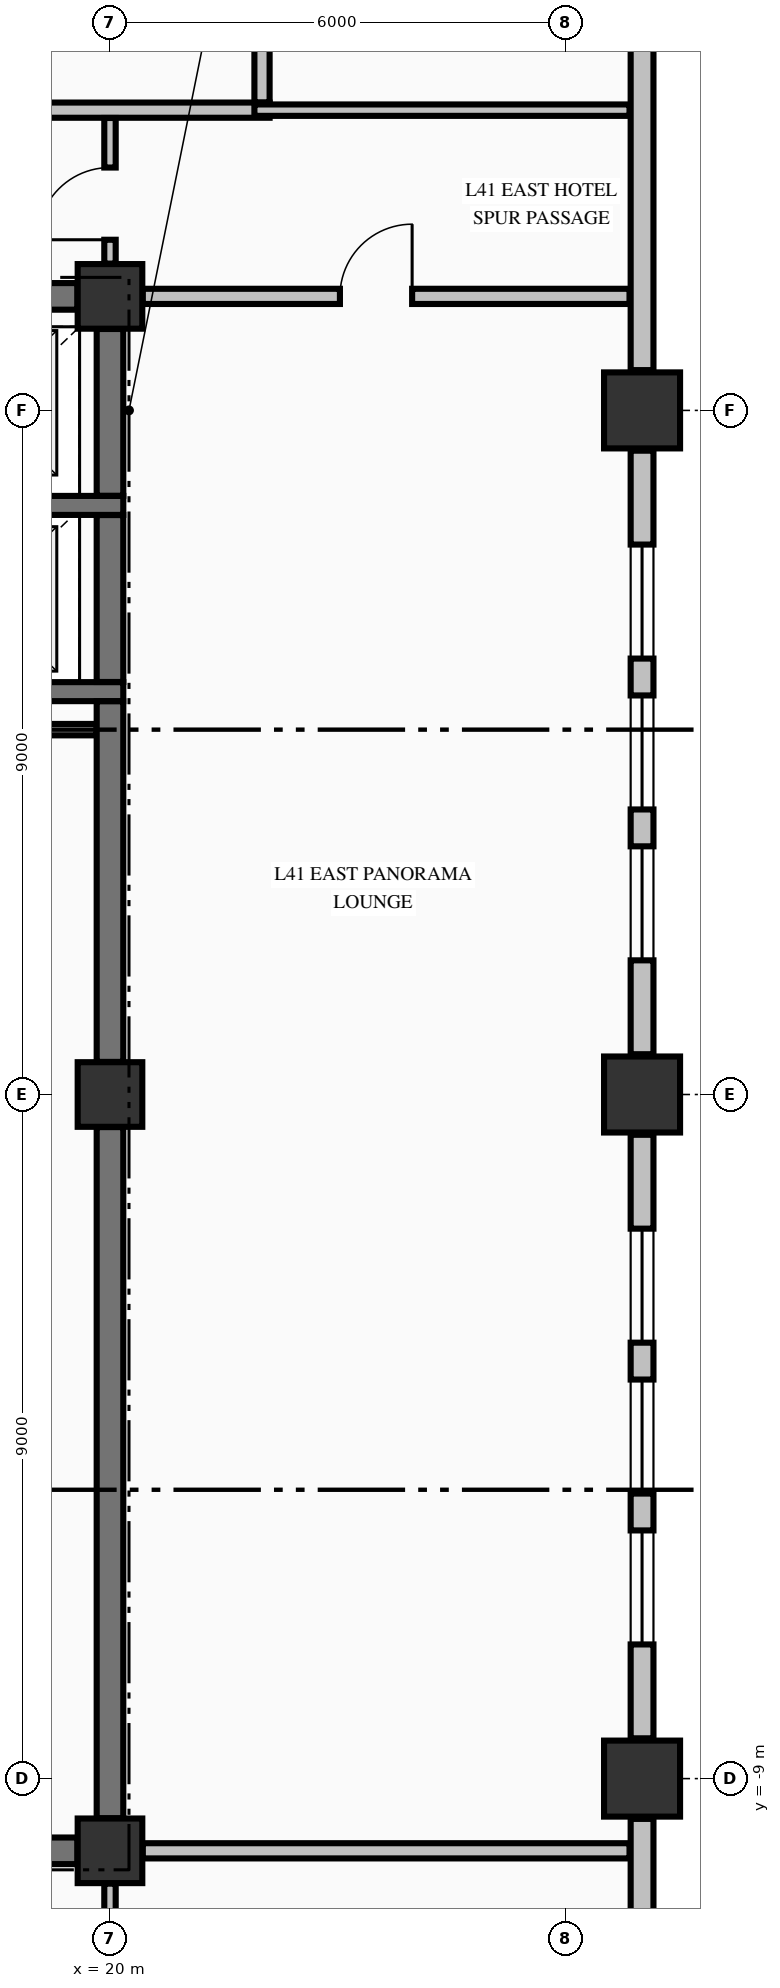
"""IFC4 building model, lengths in metres.
Left out: names, types, materials, properties, quantities, classifications, styles, units other than length and angle.
Written with IfcOpenShell. Run it as: python <this file> out.ifc"""

import sys

from ifc_helpers import new_model, si_unit, direction, frame, frame_2d, origin, origin_2d, place, context, subcontext, project, spatial, rectangle, extrude, element, fill, save


model = new_model("IFC4")
c1 = context("Model", 3, precision=1e-05, world=origin(), true_north=direction((0.0, 1.0)))
c2 = subcontext(c1, "Body", "Model", "MODEL_VIEW")
j1 = project(units=[si_unit("LENGTHUNIT", "METRE"), si_unit("PLANEANGLEUNIT", "RADIAN")], contexts=[c1])
p1 = place(None, origin())
s1 = spatial("IfcSite", under=j1, at=p1, CompositionType="ELEMENT")
p2 = place(p1, origin())
s2 = spatial("IfcBuilding", under=s1, at=p2, CompositionType="ELEMENT")
p3 = place(p2, frame((0.0, 0.0, 162.66)))
s3 = spatial("IfcBuildingStorey", under=s2, at=p3, CompositionType="ELEMENT", Elevation=162.66)
for number, where, z_axis, x_axis in (
    (1, (27.0, -9.0, -0.25), (0.0, 0.0, 1.0), (1.0, 0.0, 0.0)),
    (2, (27.0, 0.0, -0.25), (0.0, 0.0, 1.0), (1.0, 0.0, 0.0)),
    (3, (27.0, 9.0, -0.25), (0.0, 0.0, 1.0), (1.0, 0.0, 0.0)),
):
    element("IfcColumn", number, at=place(p3, frame(where, z_axis=z_axis, x_axis=x_axis)), inside=s3, PredefinedType="COLUMN", context=c2, shape_type="SweptSolid", body=[
        extrude(rectangle(XDim=1.0, YDim=1.0, at=origin_2d()), origin(), (0.0, 0.0, 1.0), 3.4),
    ])
for number, where, z_axis, x_axis in (
    (4, (20.0, -9.95, -0.25), (0.0, 0.0, 1.0), (1.0, 0.0, 0.0)),
    (5, (20.0, 10.5, -0.25), (0.0, 0.0, 1.0), (1.0, 0.0, 0.0)),
    (6, (20.0, 0.0, -0.25), (0.0, 0.0, 1.0), (1.0, 0.0, 0.0)),
):
    element("IfcColumn", number, at=place(p3, frame(where, z_axis=z_axis, x_axis=x_axis)), inside=s3, PredefinedType="COLUMN", context=c2, shape_type="SweptSolid", body=[
        extrude(rectangle(XDim=0.85, YDim=0.85, at=origin_2d()), origin(), (0.0, 0.0, 1.0), 3.4),
    ])
p4 = place(p3, frame((27.0, -18.97, 0.0), z_axis=(0.0, 0.0, 1.0), x_axis=(0.0, 1.0, 0.0)))
e7 = element("IfcWall", 7, at=p4, inside=s3, PredefinedType="STANDARD", context=c2, shape_type="SweptSolid", body=[
    extrude(rectangle(XDim=9.44, YDim=0.3, at=frame_2d((4.72, 0.0))), origin(), (0.0, 0.0, 1.0), 2.542),
])
p5 = place(p3, frame((27.0, -8.47, 0.0), z_axis=(0.0, 0.0, 1.0), x_axis=(0.0, 1.0, 0.0)))
e8 = element("IfcWall", 8, at=p5, inside=s3, PredefinedType="STANDARD", context=c2, shape_type="SweptSolid", body=[
    extrude(rectangle(XDim=7.94, YDim=0.3, at=frame_2d((3.97, 0.0))), origin(), (0.0, 0.0, 1.0), 2.542),
])
p6 = place(p5, frame((1.235, 0.0, 0.72)))
e9 = element("IfcOpeningElement", 9, at=p6, cuts=e8, PredefinedType="OPENING", context=c2, shape_type="SweptSolid", body=[
    extrude(rectangle(XDim=1.5, YDim=1.6, at=frame_2d((0.75, 0.8))), frame((0.0, 0.16, 0.0), z_axis=(0.0, -1.0, 0.0), x_axis=(1.0, 0.0, 0.0)), (0.0, 0.0, 1.0), 0.32),
])
p7 = place(p5, frame((3.22, 0.0, 0.72)))
e10 = element("IfcOpeningElement", 10, at=p7, cuts=e8, PredefinedType="OPENING", context=c2, shape_type="SweptSolid", body=[
    extrude(rectangle(XDim=1.5, YDim=1.6, at=frame_2d((0.75, 0.8))), frame((0.0, 0.16, 0.0), z_axis=(0.0, -1.0, 0.0), x_axis=(1.0, 0.0, 0.0)), (0.0, 0.0, 1.0), 0.32),
])
p8 = place(p5, frame((5.205, 0.0, 0.72)))
e11 = element("IfcOpeningElement", 11, at=p8, cuts=e8, PredefinedType="OPENING", context=c2, shape_type="SweptSolid", body=[
    extrude(rectangle(XDim=1.5, YDim=1.6, at=frame_2d((0.75, 0.8))), frame((0.0, 0.16, 0.0), z_axis=(0.0, -1.0, 0.0), x_axis=(1.0, 0.0, 0.0)), (0.0, 0.0, 1.0), 0.32),
])
p9 = place(p3, frame((27.0, 0.53, 0.0), z_axis=(0.0, 0.0, 1.0), x_axis=(0.0, 1.0, 0.0)))
e12 = element("IfcWall", 12, at=p9, inside=s3, PredefinedType="STANDARD", context=c2, shape_type="SweptSolid", body=[
    extrude(rectangle(XDim=7.94, YDim=0.3, at=frame_2d((3.97, 0.0))), origin(), (0.0, 0.0, 1.0), 2.542),
])
p10 = place(p9, frame((1.235, 0.0, 0.72)))
e13 = element("IfcOpeningElement", 13, at=p10, cuts=e12, PredefinedType="OPENING", context=c2, shape_type="SweptSolid", body=[
    extrude(rectangle(XDim=1.5, YDim=1.6, at=frame_2d((0.75, 0.8))), frame((0.0, 0.16, 0.0), z_axis=(0.0, -1.0, 0.0), x_axis=(1.0, 0.0, 0.0)), (0.0, 0.0, 1.0), 0.32),
])
p11 = place(p9, frame((3.22, 0.0, 0.72)))
e14 = element("IfcOpeningElement", 14, at=p11, cuts=e12, PredefinedType="OPENING", context=c2, shape_type="SweptSolid", body=[
    extrude(rectangle(XDim=1.5, YDim=1.6, at=frame_2d((0.75, 0.8))), frame((0.0, 0.16, 0.0), z_axis=(0.0, -1.0, 0.0), x_axis=(1.0, 0.0, 0.0)), (0.0, 0.0, 1.0), 0.32),
])
p12 = place(p9, frame((5.205, 0.0, 0.72)))
e15 = element("IfcOpeningElement", 15, at=p12, cuts=e12, PredefinedType="OPENING", context=c2, shape_type="SweptSolid", body=[
    extrude(rectangle(XDim=1.5, YDim=1.6, at=frame_2d((0.75, 0.8))), frame((0.0, 0.16, 0.0), z_axis=(0.0, -1.0, 0.0), x_axis=(1.0, 0.0, 0.0)), (0.0, 0.0, 1.0), 0.32),
])
p13 = place(p3, frame((27.0, 9.53, 0.0), z_axis=(0.0, 0.0, 1.0), x_axis=(0.0, 1.0, 0.0)))
e16 = element("IfcWall", 16, at=p13, inside=s3, PredefinedType="STANDARD", context=c2, shape_type="SweptSolid", body=[
    extrude(rectangle(XDim=9.44, YDim=0.3, at=frame_2d((4.72, 0.0))), origin(), (0.0, 0.0, 1.0), 2.542),
])
p14 = place(p3, frame((14.7, -9.95, 0.0), z_axis=(0.0, 0.0, 1.0), x_axis=(1.0, 0.0, 0.0)))
e17 = element("IfcWall", 17, at=p14, inside=s3, PredefinedType="SHEAR", context=c2, shape_type="SweptSolid", body=[
    extrude(rectangle(XDim=4.871, YDim=0.35, at=frame_2d((2.436, 0.0))), origin(), (0.0, 0.0, 1.0), 3.15),
])
p15 = place(p14, frame((3.25, 0.0, 0.0)))
e18 = element("IfcOpeningElement", 18, at=p15, cuts=e17, PredefinedType="OPENING", context=c2, shape_type="SweptSolid", body=[
    extrude(rectangle(XDim=0.9, YDim=2.15, at=frame_2d((0.45, 1.075))), frame((0.0, 0.185, 0.0), z_axis=(0.0, -1.0, 0.0), x_axis=(1.0, 0.0, 0.0)), (0.0, 0.0, 1.0), 0.37),
])
p16 = place(p14, frame((0.575, 0.0, 0.0)))
e19 = element("IfcOpeningElement", 19, at=p16, cuts=e17, PredefinedType="OPENING", context=c2, shape_type="SweptSolid", body=[
    extrude(rectangle(XDim=0.95, YDim=2.15, at=frame_2d((0.475, 1.075))), frame((0.0, 0.185, 0.0), z_axis=(0.0, -1.0, 0.0), x_axis=(1.0, 0.0, 0.0)), (0.0, 0.0, 1.0), 0.37),
])
for number, where, z_axis, x_axis in (
    (20, (17.025, 5.3, 0.0), (0.0, 0.0, 1.0), (1.0, 0.0, 0.0)),
    (21, (17.025, 7.75, 0.0), (0.0, 0.0, 1.0), (1.0, 0.0, 0.0)),
):
    element("IfcWall", number, at=place(p3, frame(where, z_axis=z_axis, x_axis=x_axis)), inside=s3, PredefinedType="SOLIDWALL", context=c2, shape_type="SweptSolid", body=[
        extrude(rectangle(XDim=3.15, YDim=0.25, at=frame_2d((1.575, 0.0))), origin(), (0.0, 0.0, 1.0), 3.15),
    ])
p17 = place(p3, frame((14.7, 10.5, 0.0), z_axis=(0.0, 0.0, 1.0), x_axis=(1.0, 0.0, 0.0)))
e22 = element("IfcWall", 22, at=p17, inside=s3, PredefinedType="SHEAR", context=c2, shape_type="SweptSolid", body=[
    extrude(rectangle(XDim=4.871, YDim=0.35, at=frame_2d((2.436, 0.0))), origin(), (0.0, 0.0, 1.0), 3.15),
])
p18 = place(p17, frame((0.7, 0.0, 0.0)))
e23 = element("IfcOpeningElement", 23, at=p18, cuts=e22, PredefinedType="OPENING", context=c2, shape_type="SweptSolid", body=[
    extrude(rectangle(XDim=1.1, YDim=2.15, at=frame_2d((0.55, 1.075))), frame((0.0, 0.185, 0.0), z_axis=(0.0, -1.0, 0.0), x_axis=(1.0, 0.0, 0.0)), (0.0, 0.0, 1.0), 0.37),
])
p19 = place(p3, frame((20.431, -9.95, 0.0), z_axis=(0.0, 0.0, 1.0), x_axis=(1.0, 0.0, 0.0)))
e24 = element("IfcWall", 24, at=p19, inside=s3, PredefinedType="PARTITIONING", context=c2, shape_type="SweptSolid", body=[
    extrude(rectangle(XDim=6.404, YDim=0.2, at=frame_2d((3.202, 0.0))), origin(), (0.0, 0.0, 1.0), 3.15),
])
p20 = place(p3, frame((14.878, 4.8, 0.0), z_axis=(0.0, 0.0, 1.0), x_axis=(1.0, 0.0, 0.0)))
e25 = element("IfcWall", 25, at=p20, inside=s3, PredefinedType="PARTITIONING", context=c2, shape_type="SweptSolid", body=[
    extrude(rectangle(XDim=4.944, YDim=0.15, at=frame_2d((2.472, 0.0))), origin(), (0.0, 0.0, 1.0), 3.15),
])
p21 = place(p3, frame((20.431, 10.5, 0.0), z_axis=(0.0, 0.0, 1.0), x_axis=(1.0, 0.0, 0.0)))
e26 = element("IfcWall", 26, at=p21, inside=s3, PredefinedType="PARTITIONING", context=c2, shape_type="SweptSolid", body=[
    extrude(rectangle(XDim=6.404, YDim=0.2, at=frame_2d((3.202, 0.0))), origin(), (0.0, 0.0, 1.0), 3.15),
])
p22 = place(p21, frame((2.594, 0.0, 0.0)))
e27 = element("IfcOpeningElement", 27, at=p22, cuts=e26, PredefinedType="OPENING", context=c2, shape_type="SweptSolid", body=[
    extrude(rectangle(XDim=0.95, YDim=2.15, at=frame_2d((0.475, 1.075))), frame((0.0, 0.11, 0.0), z_axis=(0.0, -1.0, 0.0), x_axis=(1.0, 0.0, 0.0)), (0.0, 0.0, 1.0), 0.22),
])
p23 = place(p3, frame((-17.1, 12.95, 0.0), z_axis=(0.0, 0.0, 1.0), x_axis=(1.0, 0.0, 0.0)))
e28 = element("IfcWall", 28, at=p23, inside=s3, PredefinedType="PARTITIONING", context=c2, shape_type="SweptSolid", body=[
    extrude(rectangle(XDim=39.2, YDim=0.2, at=frame_2d((19.6, 0.0))), origin(), (0.0, 0.0, 1.0), 3.15),
])
p24 = place(p23, frame((3.695, 0.0, 0.0)))
e29 = element("IfcOpeningElement", 29, at=p24, cuts=e28, PredefinedType="OPENING", context=c2, shape_type="SweptSolid", body=[
    extrude(rectangle(XDim=0.95, YDim=2.15, at=frame_2d((0.475, 1.075))), frame((0.0, 0.11, 0.0), z_axis=(0.0, -1.0, 0.0), x_axis=(1.0, 0.0, 0.0)), (0.0, 0.0, 1.0), 0.22),
])
p25 = place(p23, frame((12.925, 0.0, 0.0)))
e30 = element("IfcOpeningElement", 30, at=p25, cuts=e28, PredefinedType="OPENING", context=c2, shape_type="SweptSolid", body=[
    extrude(rectangle(XDim=0.95, YDim=2.15, at=frame_2d((0.475, 1.075))), frame((0.0, 0.11, 0.0), z_axis=(0.0, -1.0, 0.0), x_axis=(1.0, 0.0, 0.0)), (0.0, 0.0, 1.0), 0.22),
])
p26 = place(p23, frame((24.525, 0.0, 0.0)))
e31 = element("IfcOpeningElement", 31, at=p26, cuts=e28, PredefinedType="OPENING", context=c2, shape_type="SweptSolid", body=[
    extrude(rectangle(XDim=0.95, YDim=2.15, at=frame_2d((0.475, 1.075))), frame((0.0, 0.11, 0.0), z_axis=(0.0, -1.0, 0.0), x_axis=(1.0, 0.0, 0.0)), (0.0, 0.0, 1.0), 0.22),
])
p27 = place(p23, frame((33.695, 0.0, 0.0)))
e32 = element("IfcOpeningElement", 32, at=p27, cuts=e28, PredefinedType="OPENING", context=c2, shape_type="SweptSolid", body=[
    extrude(rectangle(XDim=0.95, YDim=2.15, at=frame_2d((0.475, 1.075))), frame((0.0, 0.11, 0.0), z_axis=(0.0, -1.0, 0.0), x_axis=(1.0, 0.0, 0.0)), (0.0, 0.0, 1.0), 0.22),
])
p28 = place(p3, frame((21.9, 12.95, 0.0), z_axis=(0.0, 0.0, 1.0), x_axis=(1.0, 0.0, 0.0)))
e33 = element("IfcWall", 33, at=p28, inside=s3, PredefinedType="PARTITIONING", context=c2, shape_type="SweptSolid", body=[
    extrude(rectangle(XDim=4.935, YDim=0.15, at=frame_2d((2.468, 0.0))), origin(), (0.0, 0.0, 1.0), 3.15),
])
p29 = place(p3, frame((20.0, -9.521, 0.0), z_axis=(0.0, 0.0, 1.0), x_axis=(0.0, 1.0, 0.0)))
e34 = element("IfcWall", 34, at=p29, inside=s3, PredefinedType="SHEAR", context=c2, shape_type="SweptSolid", body=[
    extrude(rectangle(XDim=9.092, YDim=0.35, at=frame_2d((4.546, 0.0))), origin(), (0.0, 0.0, 1.0), 3.15),
])
p30 = place(p3, frame((20.0, 0.429, 0.0), z_axis=(0.0, 0.0, 1.0), x_axis=(0.0, 1.0, 0.0)))
e35 = element("IfcWall", 35, at=p30, inside=s3, PredefinedType="SHEAR", context=c2, shape_type="SweptSolid", body=[
    extrude(rectangle(XDim=4.744, YDim=0.35, at=frame_2d((2.372, 0.0))), origin(), (0.0, 0.0, 1.0), 3.15),
])
p31 = place(p3, frame((20.0, 5.427, 0.0), z_axis=(0.0, 0.0, 1.0), x_axis=(0.0, 1.0, 0.0)))
e36 = element("IfcWall", 36, at=p31, inside=s3, PredefinedType="SHEAR", context=c2, shape_type="SweptSolid", body=[
    extrude(rectangle(XDim=2.196, YDim=0.35, at=frame_2d((1.098, 0.0))), origin(), (0.0, 0.0, 1.0), 3.15),
])
p32 = place(p3, frame((20.0, 7.877, 0.0), z_axis=(0.0, 0.0, 1.0), x_axis=(0.0, 1.0, 0.0)))
e37 = element("IfcWall", 37, at=p32, inside=s3, PredefinedType="SHEAR", context=c2, shape_type="SweptSolid", body=[
    extrude(rectangle(XDim=2.194, YDim=0.35, at=frame_2d((1.097, 0.0))), origin(), (0.0, 0.0, 1.0), 3.15),
])
p33 = place(p3, frame((20.0, -12.997, 0.0), z_axis=(0.0, 0.0, 1.0), x_axis=(0.0, 1.0, 0.0)))
e38 = element("IfcWall", 38, at=p33, inside=s3, PredefinedType="PARTITIONING", context=c2, shape_type="SweptSolid", body=[
    extrude(rectangle(XDim=2.616, YDim=0.15, at=frame_2d((1.308, 0.0))), origin(), (0.0, 0.0, 1.0), 2.342),
])
p34 = place(p3, frame((20.0, 10.931, 0.0), z_axis=(0.0, 0.0, 1.0), x_axis=(0.0, 1.0, 0.0)))
e39 = element("IfcWall", 39, at=p34, inside=s3, PredefinedType="PARTITIONING", context=c2, shape_type="SweptSolid", body=[
    extrude(rectangle(XDim=1.916, YDim=0.15, at=frame_2d((0.958, 0.0))), origin(), (0.0, 0.0, 1.0), 2.342),
])
p35 = place(p34, frame((0.314, 0.0, 0.0)))
e40 = element("IfcOpeningElement", 40, at=p35, cuts=e39, PredefinedType="OPENING", context=c2, shape_type="SweptSolid", body=[
    extrude(rectangle(XDim=0.95, YDim=2.15, at=frame_2d((0.475, 1.075))), frame((0.0, 0.085, 0.0), z_axis=(0.0, -1.0, 0.0), x_axis=(1.0, 0.0, 0.0)), (0.0, 0.0, 1.0), 0.17),
])
p36 = place(p3, frame((22.0, 13.053, 0.0), z_axis=(0.0, 0.0, 1.0), x_axis=(0.0, 1.0, 0.0)))
e41 = element("IfcWall", 41, at=p36, inside=s3, PredefinedType="PARTITIONING", context=c2, shape_type="SweptSolid", body=[
    extrude(rectangle(XDim=5.941, YDim=0.2, at=frame_2d((2.97, 0.0))), origin(), (0.0, 0.0, 1.0), 3.15),
])
p37 = place(p6, origin())
e42 = element("IfcWindow", 42, at=p37, inside=s3, PartitioningType="SINGLE_PANEL", PredefinedType="WINDOW", context=c2, shape_type="SweptSolid", body=[
    extrude(rectangle(XDim=1.5, YDim=1.6, at=frame_2d((0.75, 0.8))), frame((0.0, 0.03, 0.0), z_axis=(0.0, -1.0, 0.0), x_axis=(1.0, 0.0, 0.0)), (0.0, 0.0, 1.0), 0.06),
])
fill(e9, e42)
p38 = place(p7, origin())
e43 = element("IfcWindow", 43, at=p38, inside=s3, PartitioningType="SINGLE_PANEL", PredefinedType="WINDOW", context=c2, shape_type="SweptSolid", body=[
    extrude(rectangle(XDim=1.5, YDim=1.6, at=frame_2d((0.75, 0.8))), frame((0.0, 0.03, 0.0), z_axis=(0.0, -1.0, 0.0), x_axis=(1.0, 0.0, 0.0)), (0.0, 0.0, 1.0), 0.06),
])
fill(e10, e43)
p39 = place(p8, origin())
e44 = element("IfcWindow", 44, at=p39, inside=s3, PartitioningType="SINGLE_PANEL", PredefinedType="WINDOW", context=c2, shape_type="SweptSolid", body=[
    extrude(rectangle(XDim=1.5, YDim=1.6, at=frame_2d((0.75, 0.8))), frame((0.0, 0.03, 0.0), z_axis=(0.0, -1.0, 0.0), x_axis=(1.0, 0.0, 0.0)), (0.0, 0.0, 1.0), 0.06),
])
fill(e11, e44)
p40 = place(p10, origin())
e45 = element("IfcWindow", 45, at=p40, inside=s3, PartitioningType="SINGLE_PANEL", PredefinedType="WINDOW", context=c2, shape_type="SweptSolid", body=[
    extrude(rectangle(XDim=1.5, YDim=1.6, at=frame_2d((0.75, 0.8))), frame((0.0, 0.03, 0.0), z_axis=(0.0, -1.0, 0.0), x_axis=(1.0, 0.0, 0.0)), (0.0, 0.0, 1.0), 0.06),
])
fill(e13, e45)
p41 = place(p11, origin())
e46 = element("IfcWindow", 46, at=p41, inside=s3, PartitioningType="SINGLE_PANEL", PredefinedType="WINDOW", context=c2, shape_type="SweptSolid", body=[
    extrude(rectangle(XDim=1.5, YDim=1.6, at=frame_2d((0.75, 0.8))), frame((0.0, 0.03, 0.0), z_axis=(0.0, -1.0, 0.0), x_axis=(1.0, 0.0, 0.0)), (0.0, 0.0, 1.0), 0.06),
])
fill(e14, e46)
p42 = place(p12, origin())
e47 = element("IfcWindow", 47, at=p42, inside=s3, PartitioningType="SINGLE_PANEL", PredefinedType="WINDOW", context=c2, shape_type="SweptSolid", body=[
    extrude(rectangle(XDim=1.5, YDim=1.6, at=frame_2d((0.75, 0.8))), frame((0.0, 0.03, 0.0), z_axis=(0.0, -1.0, 0.0), x_axis=(1.0, 0.0, 0.0)), (0.0, 0.0, 1.0), 0.06),
])
fill(e15, e47)
p43 = place(p35, origin())
e48 = element("IfcDoor", 48, at=p43, inside=s3, OperationType="SINGLE_SWING_LEFT", PredefinedType="DOOR", context=c2, shape_type="SweptSolid", body=[
    extrude(rectangle(XDim=0.95, YDim=2.15, at=frame_2d((0.475, 1.075))), frame((0.0, 0.025, 0.0), z_axis=(0.0, -1.0, 0.0), x_axis=(1.0, 0.0, 0.0)), (0.0, 0.0, 1.0), 0.05),
])
fill(e40, e48)
p44 = place(p22, origin())
e49 = element("IfcDoor", 49, at=p44, inside=s3, OperationType="SINGLE_SWING_RIGHT", PredefinedType="DOOR", context=c2, shape_type="SweptSolid", body=[
    extrude(rectangle(XDim=0.95, YDim=2.15, at=frame_2d((0.475, 1.075))), frame((0.0, 0.025, 0.0), z_axis=(0.0, -1.0, 0.0), x_axis=(1.0, 0.0, 0.0)), (0.0, 0.0, 1.0), 0.05),
])
fill(e27, e49)
save(model, sys.argv[1])
